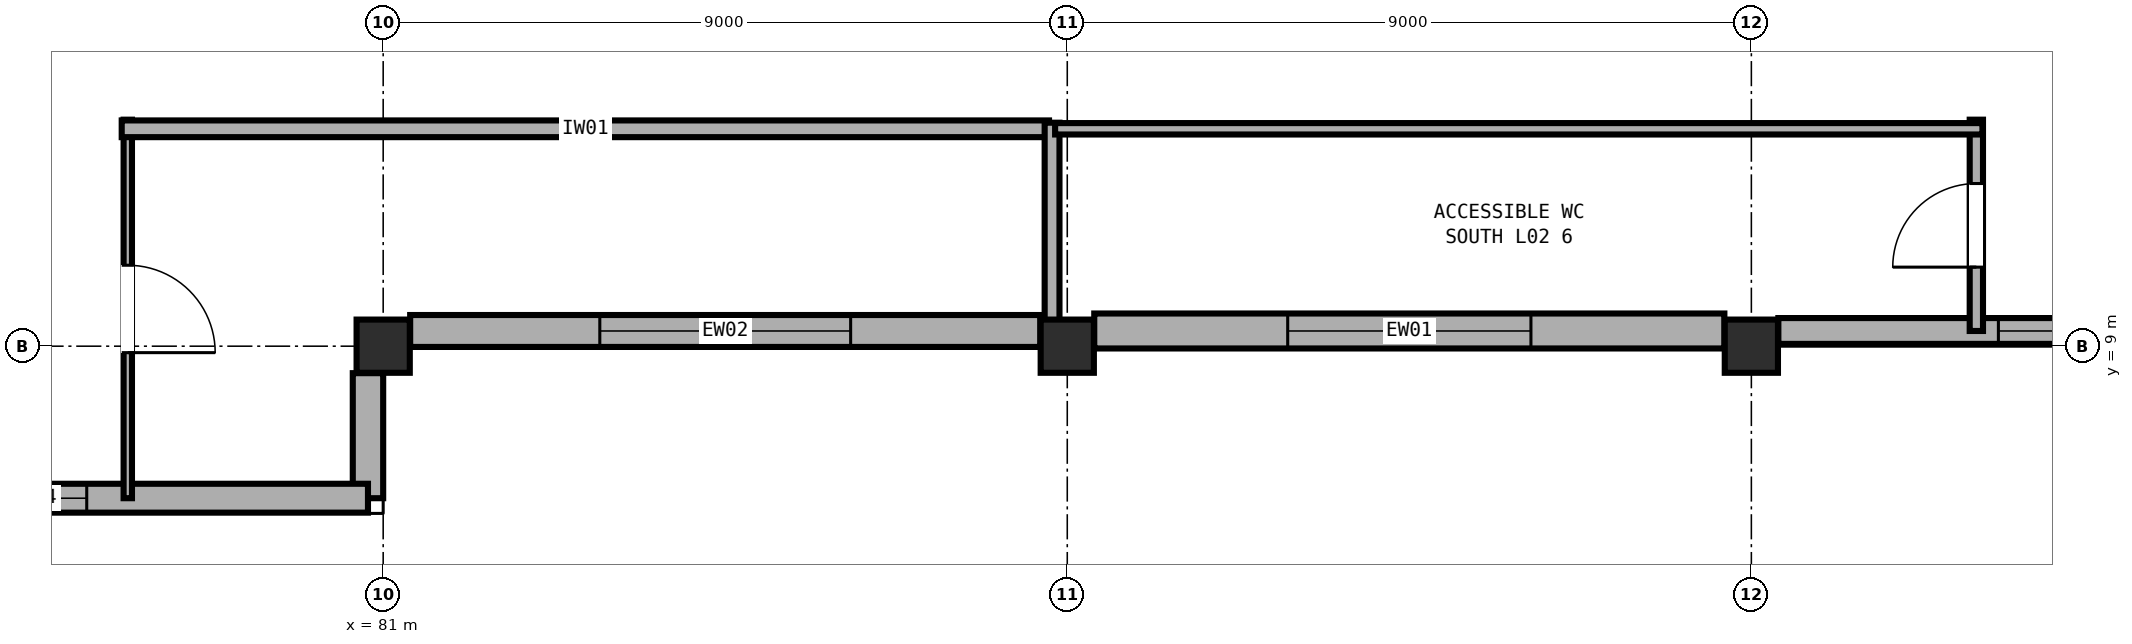
"""IFC4 building model, lengths in metres.
Left out: names, types, materials, properties, quantities, classifications, styles, units other than length and angle.
Written with IfcOpenShell. Run it as: python <this file> out.ifc"""

import sys

from ifc_helpers import new_model, si_unit, direction, frame, frame_2d, origin, origin_2d, place, context, subcontext, project, spatial, rectangle, extrude, element, fill, save


model = new_model("IFC4")
c1 = context("Model", 3, precision=1e-05, world=origin(), true_north=direction((0.0, 1.0)))
c2 = subcontext(c1, "Body", "Model", "MODEL_VIEW")
j1 = project(units=[si_unit("LENGTHUNIT", "METRE"), si_unit("PLANEANGLEUNIT", "RADIAN")], contexts=[c1])
p1 = place(None, origin())
s1 = spatial("IfcSite", under=j1, at=p1, CompositionType="ELEMENT")
p2 = place(p1, origin())
s2 = spatial("IfcBuilding", under=s1, at=p2, CompositionType="ELEMENT")
p3 = place(p2, frame((0.0, 0.0, 9.6)))
s3 = spatial("IfcBuildingStorey", under=s2, at=p3, CompositionType="ELEMENT", Elevation=9.6)
for number, where, z_axis, x_axis in (
    (1, (81.0, 9.0, 0.0), (0.0, 0.0, 1.0), (1.0, 0.0, 0.0)),
    (2, (90.0, 9.0, 0.0), (0.0, 0.0, 1.0), (1.0, 0.0, 0.0)),
    (3, (99.0, 9.0, 0.0), (0.0, 0.0, 1.0), (1.0, 0.0, 0.0)),
):
    element("IfcColumn", number, at=place(p3, frame(where, z_axis=z_axis, x_axis=x_axis)), inside=s3, PredefinedType="COLUMN", context=c2, shape_type="SweptSolid", body=[
        extrude(rectangle(XDim=0.7, YDim=0.7, at=origin_2d()), origin(), (0.0, 0.0, 1.0), 4.8),
    ])
p4 = place(p3, frame((107.645, 9.2, 0.0), z_axis=(0.0, 0.0, 1.0), x_axis=(-1.0, 0.0, 0.0)))
e4 = element("IfcWall", 4, at=p4, inside=s3, PredefinedType="SOLIDWALL", context=c2, shape_type="SweptSolid", body=[
    extrude(rectangle(XDim=8.29, YDim=0.34, at=frame_2d((4.145, 0.0))), origin(), (0.0, 0.0, 1.0), 3.58),
])
p5 = place(p4, frame((2.295, 0.0, 0.9)))
e5 = element("IfcOpeningElement", 5, at=p5, cuts=e4, PredefinedType="OPENING", context=c2, shape_type="SweptSolid", body=[
    extrude(rectangle(XDim=3.1, YDim=2.1, at=frame_2d((1.55, 1.05))), frame((0.0, 0.18, 0.0), z_axis=(0.0, -1.0, 0.0), x_axis=(1.0, 0.0, 0.0)), (0.0, 0.0, 1.0), 0.36),
])
p6 = place(p3, frame((98.645, 9.2, 0.0), z_axis=(0.0, 0.0, 1.0), x_axis=(-1.0, 0.0, 0.0)))
e6 = element("IfcWall", 6, at=p6, inside=s3, PredefinedType="SOLIDWALL", context=c2, shape_type="SweptSolid", body=[
    extrude(rectangle(XDim=8.29, YDim=0.46, at=frame_2d((4.145, 0.0))), origin(), (0.0, 0.0, 1.0), 3.58),
])
p7 = place(p6, frame((2.545, 0.0, 0.9)))
e7 = element("IfcOpeningElement", 7, at=p7, cuts=e6, PredefinedType="OPENING", context=c2, shape_type="SweptSolid", body=[
    extrude(rectangle(XDim=3.2, YDim=2.05, at=frame_2d((1.6, 1.025))), frame((0.0, 0.24, 0.0), z_axis=(0.0, -1.0, 0.0), x_axis=(1.0, 0.0, 0.0)), (0.0, 0.0, 1.0), 0.48),
])
p8 = place(p3, frame((89.645, 9.2, 0.0), z_axis=(0.0, 0.0, 1.0), x_axis=(-1.0, 0.0, 0.0)))
e8 = element("IfcWall", 8, at=p8, inside=s3, PredefinedType="SOLIDWALL", context=c2, shape_type="SweptSolid", body=[
    extrude(rectangle(XDim=8.29, YDim=0.42, at=frame_2d((4.145, 0.0))), origin(), (0.0, 0.0, 1.0), 3.58),
])
p9 = place(p8, frame((2.495, 0.0, 0.9)))
e9 = element("IfcOpeningElement", 9, at=p9, cuts=e8, PredefinedType="OPENING", context=c2, shape_type="SweptSolid", body=[
    extrude(rectangle(XDim=3.3, YDim=2.0, at=frame_2d((1.65, 1.0))), frame((0.0, 0.22, 0.0), z_axis=(0.0, -1.0, 0.0), x_axis=(1.0, 0.0, 0.0)), (0.0, 0.0, 1.0), 0.44),
])
p10 = place(p3, frame((80.8, 8.645, 0.0), z_axis=(0.0, 0.0, 1.0), x_axis=(0.0, -1.0, 0.0)))
e10 = element("IfcWall", 10, at=p10, inside=s3, PredefinedType="SOLIDWALL", context=c2, shape_type="SweptSolid", body=[
    extrude(rectangle(XDim=1.645, YDim=0.4, at=frame_2d((0.823, 0.0))), origin(), (0.0, 0.0, 1.0), 3.58),
])
p11 = place(p3, frame((80.8, 7.0, 0.0), z_axis=(0.0, 0.0, 1.0), x_axis=(-1.0, 0.0, 0.0)))
e11 = element("IfcWall", 11, at=p11, inside=s3, PredefinedType="SOLIDWALL", context=c2, shape_type="SweptSolid", body=[
    extrude(rectangle(XDim=8.783, YDim=0.38, at=frame_2d((4.392, 0.0))), origin(), (0.0, 0.0, 1.0), 3.58),
])
p12 = place(p11, frame((3.7, 0.0, 0.9)))
e12 = element("IfcOpeningElement", 12, at=p12, cuts=e11, PredefinedType="OPENING", context=c2, shape_type="SweptSolid", body=[
    extrude(rectangle(XDim=3.4, YDim=1.95, at=frame_2d((1.7, 0.975))), frame((0.0, 0.2, 0.0), z_axis=(0.0, -1.0, 0.0), x_axis=(1.0, 0.0, 0.0)), (0.0, 0.0, 1.0), 0.4),
])
p13 = place(p3, frame((77.64, 11.98, 0.0), z_axis=(0.0, 0.0, 1.0), x_axis=(0.0, -1.0, 0.0)))
e13 = element("IfcWall", 13, at=p13, inside=s3, PredefinedType="PARTITIONING", context=c2, shape_type="SweptSolid", body=[
    extrude(rectangle(XDim=4.98, YDim=0.11, at=frame_2d((2.49, 0.0))), origin(), (0.0, 0.0, 1.0), 3.56),
])
p14 = place(p13, frame((1.915, 0.0, 0.0)))
e14 = element("IfcOpeningElement", 14, at=p14, cuts=e13, PredefinedType="OPENING", context=c2, shape_type="SweptSolid", body=[
    extrude(rectangle(XDim=1.15, YDim=2.15, at=frame_2d((0.575, 1.075))), frame((0.0, 0.065, 0.0), z_axis=(0.0, -1.0, 0.0), x_axis=(1.0, 0.0, 0.0)), (0.0, 0.0, 1.0), 0.13),
])
p15 = place(p3, frame((77.56, 11.86, 0.0), z_axis=(0.0, 0.0, 1.0), x_axis=(1.0, 0.0, 0.0)))
e15 = element("IfcWall", 15, at=p15, inside=s3, PredefinedType="PARTITIONING", context=c2, shape_type="SweptSolid", body=[
    extrude(rectangle(XDim=12.2, YDim=0.22, at=frame_2d((6.1, 0.0))), origin(), (0.0, 0.0, 1.0), 3.56),
])
p16 = place(p3, frame((89.8, 11.94, 0.0), z_axis=(0.0, 0.0, 1.0), x_axis=(0.0, -1.0, 0.0)))
e16 = element("IfcWall", 16, at=p16, inside=s3, PredefinedType="PARTITIONING", context=c2, shape_type="SweptSolid", body=[
    extrude(rectangle(XDim=2.7, YDim=0.195, at=frame_2d((1.35, 0.0))), origin(), (0.0, 0.0, 1.0), 3.56),
])
p17 = place(p3, frame((101.96, 9.2, 0.0), z_axis=(0.0, 0.0, 1.0), x_axis=(0.0, 1.0, 0.0)))
e17 = element("IfcWall", 17, at=p17, inside=s3, PredefinedType="PARTITIONING", context=c2, shape_type="SweptSolid", body=[
    extrude(rectangle(XDim=2.78, YDim=0.175, at=frame_2d((1.39, 0.0))), origin(), (0.0, 0.0, 1.0), 3.56),
])
p18 = place(p17, frame((0.84, 0.0, 0.0)))
e18 = element("IfcOpeningElement", 18, at=p18, cuts=e17, PredefinedType="OPENING", context=c2, shape_type="SweptSolid", body=[
    extrude(rectangle(XDim=1.1, YDim=2.1, at=frame_2d((0.55, 1.05))), frame((0.0, 0.097, 0.0), z_axis=(0.0, -1.0, 0.0), x_axis=(1.0, 0.0, 0.0)), (0.0, 0.0, 1.0), 0.195),
])
p19 = place(p3, frame((89.84, 11.86, 0.0), z_axis=(0.0, 0.0, 1.0), x_axis=(1.0, 0.0, 0.0)))
e19 = element("IfcWall", 19, at=p19, inside=s3, PredefinedType="PARTITIONING", context=c2, shape_type="SweptSolid", body=[
    extrude(rectangle(XDim=12.2, YDim=0.15, at=frame_2d((6.1, 0.0))), origin(), (0.0, 0.0, 1.0), 3.56),
])
p20 = place(p5, origin())
e20 = element("IfcWindow", 20, at=p20, inside=s3, PartitioningType="DOUBLE_PANEL_VERTICAL", PredefinedType="WINDOW", context=c2, shape_type="SweptSolid", body=[
    extrude(rectangle(XDim=3.1, YDim=2.1, at=frame_2d((1.55, 1.05))), frame((0.0, 0.03, 0.0), z_axis=(0.0, -1.0, 0.0), x_axis=(1.0, 0.0, 0.0)), (0.0, 0.0, 1.0), 0.06),
])
fill(e5, e20)
p21 = place(p7, origin())
e21 = element("IfcWindow", 21, at=p21, inside=s3, PartitioningType="DOUBLE_PANEL_VERTICAL", PredefinedType="WINDOW", context=c2, shape_type="SweptSolid", body=[
    extrude(rectangle(XDim=3.2, YDim=2.05, at=frame_2d((1.6, 1.025))), frame((0.0, 0.03, 0.0), z_axis=(0.0, -1.0, 0.0), x_axis=(1.0, 0.0, 0.0)), (0.0, 0.0, 1.0), 0.06),
])
fill(e7, e21)
p22 = place(p9, origin())
e22 = element("IfcWindow", 22, at=p22, inside=s3, PartitioningType="DOUBLE_PANEL_VERTICAL", PredefinedType="WINDOW", context=c2, shape_type="SweptSolid", body=[
    extrude(rectangle(XDim=3.3, YDim=2.0, at=frame_2d((1.65, 1.0))), frame((0.0, 0.03, 0.0), z_axis=(0.0, -1.0, 0.0), x_axis=(1.0, 0.0, 0.0)), (0.0, 0.0, 1.0), 0.06),
])
fill(e9, e22)
p23 = place(p12, origin())
e23 = element("IfcWindow", 23, at=p23, inside=s3, PartitioningType="DOUBLE_PANEL_VERTICAL", PredefinedType="WINDOW", context=c2, shape_type="SweptSolid", body=[
    extrude(rectangle(XDim=3.4, YDim=1.95, at=frame_2d((1.7, 0.975))), frame((0.0, 0.03, 0.0), z_axis=(0.0, -1.0, 0.0), x_axis=(1.0, 0.0, 0.0)), (0.0, 0.0, 1.0), 0.06),
])
fill(e12, e23)
p24 = place(p14, origin())
e24 = element("IfcDoor", 24, at=p24, inside=s3, OperationType="SINGLE_SWING_RIGHT", PredefinedType="DOOR", context=c2, shape_type="SweptSolid", body=[
    extrude(rectangle(XDim=1.15, YDim=2.15, at=frame_2d((0.575, 1.075))), frame((0.0, 0.025, 0.0), z_axis=(0.0, -1.0, 0.0), x_axis=(1.0, 0.0, 0.0)), (0.0, 0.0, 1.0), 0.05),
])
fill(e14, e24)
p25 = place(p18, origin())
e25 = element("IfcDoor", 25, at=p25, inside=s3, OperationType="SINGLE_SWING_LEFT", PredefinedType="DOOR", context=c2, shape_type="SweptSolid", body=[
    extrude(rectangle(XDim=1.1, YDim=2.1, at=frame_2d((0.55, 1.05))), frame((0.0, 0.025, 0.0), z_axis=(0.0, -1.0, 0.0), x_axis=(1.0, 0.0, 0.0)), (0.0, 0.0, 1.0), 0.05),
])
fill(e18, e25)
save(model, sys.argv[1])
